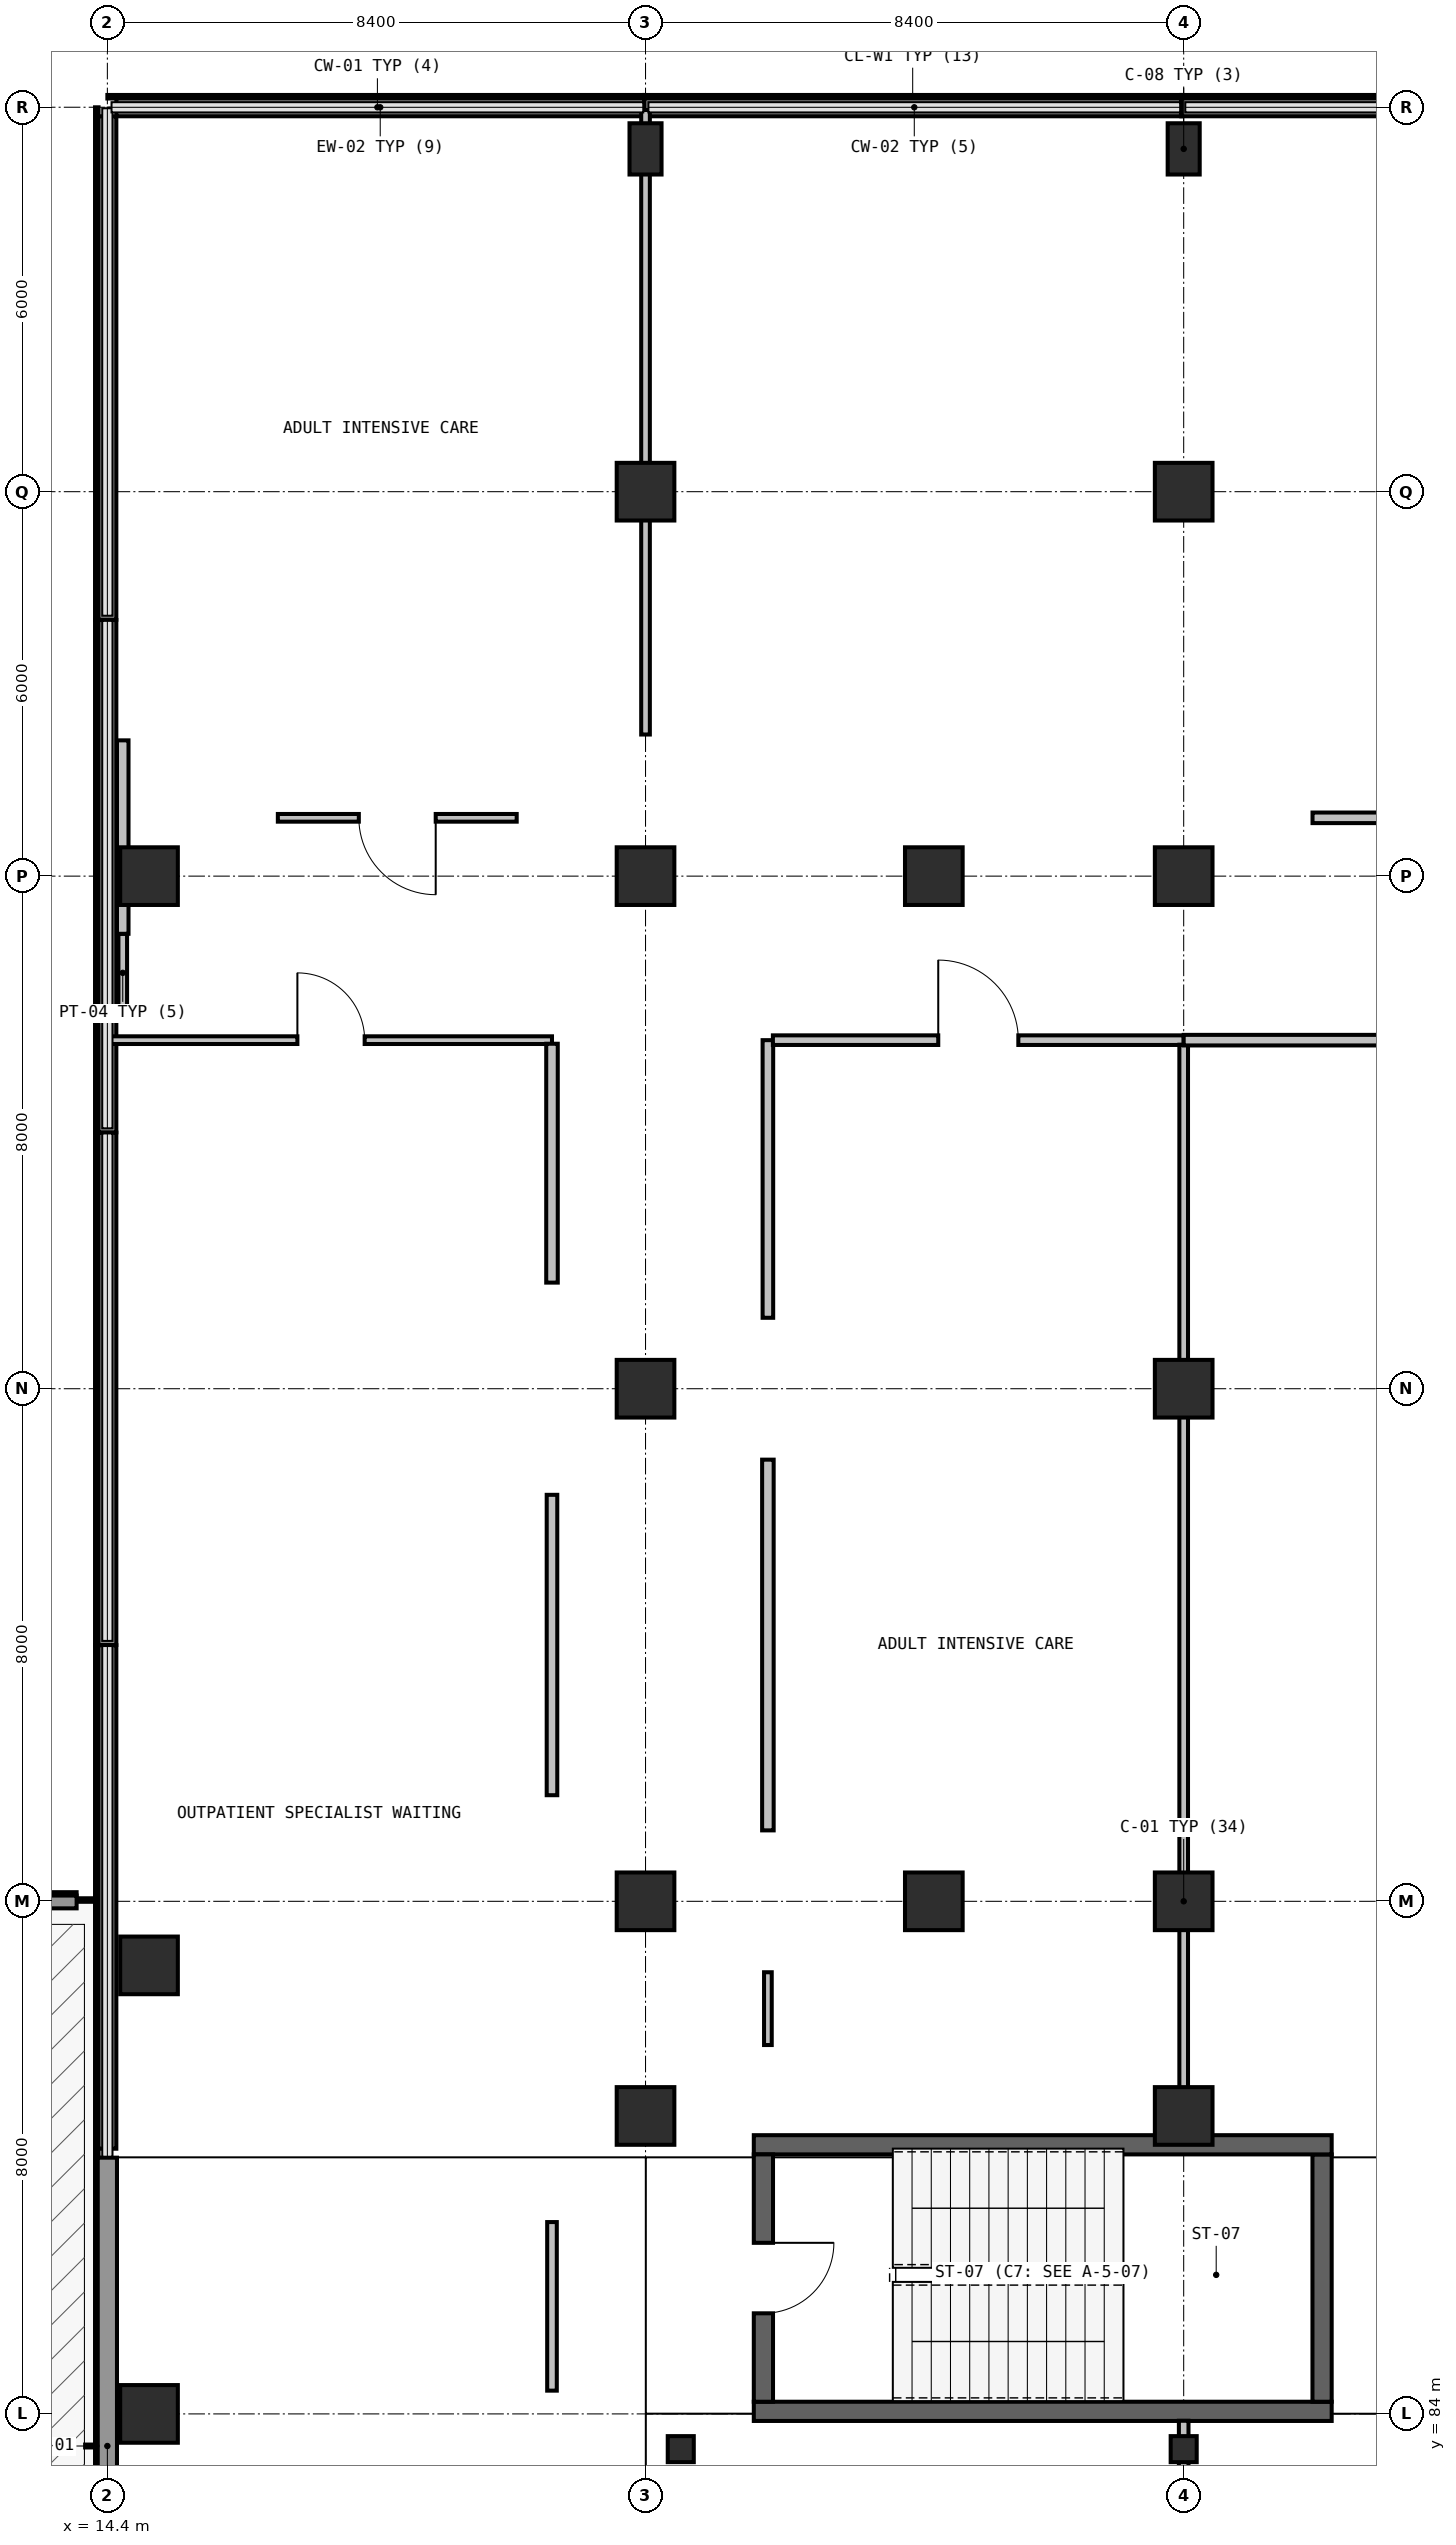
"""IFC4 building model, lengths in metres.
Left out: names, types, materials, properties, quantities, classifications, styles, units other than length and angle.
Written with IfcOpenShell. Run it as: python <this file> out.ifc"""

import sys

from ifc_helpers import new_model, si_unit, direction, frame, frame_2d, origin, origin_2d, place, context, subcontext, project, spatial, rectangle, hollow_circle, extrude, element, fill, save


model = new_model("IFC4")
c1 = context("Model", 3, precision=1e-05, world=origin(), true_north=direction((0.0, 1.0)))
c2 = subcontext(c1, "Body", "Model", "MODEL_VIEW")
j1 = project(units=[si_unit("LENGTHUNIT", "METRE"), si_unit("PLANEANGLEUNIT", "RADIAN")], contexts=[c1])
p1 = place(None, origin())
s1 = spatial("IfcSite", under=j1, at=p1, CompositionType="ELEMENT")
p2 = place(p1, origin())
s2 = spatial("IfcBuilding", under=s1, at=p2, CompositionType="ELEMENT")
p3 = place(p2, frame((0.0, 0.0, 5.4)))
s3 = spatial("IfcBuildingStorey", under=s2, at=p3, CompositionType="ELEMENT", Elevation=5.4)
for number, where, z_axis, x_axis in (
    (1, (23.35, 83.45, 0.0), (0.0, 0.0, 1.0), (1.0, 0.0, 0.0)),
    (2, (31.2, 83.45, 0.0), (0.0, 0.0, 1.0), (1.0, 0.0, 0.0)),
):
    element("IfcColumn", number, at=place(p3, frame(where, z_axis=z_axis, x_axis=x_axis)), inside=s3, PredefinedType="COLUMN", context=c2, shape_type="SweptSolid", body=[
        extrude(hollow_circle(Radius=0.203, WallThickness=0.016, at=origin_2d()), origin(), (0.0, 0.0, 1.0), 4.8),
    ])
for number, where, z_axis, x_axis in (
    (3, (15.05, 84.0, 0.0), (0.0, 0.0, 1.0), (1.0, 0.0, 0.0)),
    (4, (15.05, 91.0, 0.0), (0.0, 0.0, 1.0), (1.0, 0.0, 0.0)),
    (5, (27.3, 92.0, 0.0), (0.0, 0.0, 1.0), (1.0, 0.0, 0.0)),
    (6, (27.3, 108.0, 0.0), (0.0, 0.0, 1.0), (1.0, 0.0, 0.0)),
    (7, (15.05, 108.0, 0.0), (0.0, 0.0, 1.0), (1.0, 0.0, 0.0)),
    (8, (22.8, 88.65, 0.0), (0.0, 0.0, 1.0), (1.0, 0.0, 0.0)),
    (9, (22.8, 92.0, 0.0), (0.0, 0.0, 1.0), (1.0, 0.0, 0.0)),
    (10, (22.8, 100.0, 0.0), (0.0, 0.0, 1.0), (1.0, 0.0, 0.0)),
    (11, (22.8, 108.0, 0.0), (0.0, 0.0, 1.0), (1.0, 0.0, 0.0)),
    (12, (22.8, 114.0, 0.0), (0.0, 0.0, 1.0), (1.0, 0.0, 0.0)),
):
    element("IfcColumn", number, at=place(p3, frame(where, z_axis=z_axis, x_axis=x_axis)), inside=s3, PredefinedType="COLUMN", context=c2, shape_type="SweptSolid", body=[
        extrude(rectangle(XDim=0.9, YDim=0.9, at=origin_2d()), origin(), (0.0, 0.0, 1.0), 4.8),
    ])
p4 = place(p3, frame((22.8, 119.35, 0.0), z_axis=(0.0, 0.0, 1.0), x_axis=(1.0, 0.0, 0.0)))
e13 = element("IfcColumn", 13, at=p4, inside=s3, PredefinedType="COLUMN", context=c2, shape_type="SweptSolid", body=[
    extrude(rectangle(XDim=0.5, YDim=0.8, at=origin_2d()), origin(), (0.0, 0.0, 1.0), 4.8),
])
for number, where, z_axis, x_axis in (
    (14, (31.2, 88.65, 0.0), (0.0, 0.0, 1.0), (1.0, 0.0, 0.0)),
    (15, (31.2, 92.0, 0.0), (0.0, 0.0, 1.0), (1.0, 0.0, 0.0)),
    (16, (31.2, 100.0, 0.0), (0.0, 0.0, 1.0), (1.0, 0.0, 0.0)),
    (17, (31.2, 108.0, 0.0), (0.0, 0.0, 1.0), (1.0, 0.0, 0.0)),
    (18, (31.2, 114.0, 0.0), (0.0, 0.0, 1.0), (1.0, 0.0, 0.0)),
):
    element("IfcColumn", number, at=place(p3, frame(where, z_axis=z_axis, x_axis=x_axis)), inside=s3, PredefinedType="COLUMN", context=c2, shape_type="SweptSolid", body=[
        extrude(rectangle(XDim=0.9, YDim=0.9, at=origin_2d()), origin(), (0.0, 0.0, 1.0), 4.8),
    ])
p5 = place(p3, frame((31.2, 119.35, 0.0), z_axis=(0.0, 0.0, 1.0), x_axis=(1.0, 0.0, 0.0)))
e19 = element("IfcColumn", 19, at=p5, inside=s3, PredefinedType="COLUMN", context=c2, shape_type="SweptSolid", body=[
    extrude(rectangle(XDim=0.5, YDim=0.8, at=origin_2d()), origin(), (0.0, 0.0, 1.0), 4.8),
])
p6 = place(p3, frame((14.4, 78.999, 0.0), z_axis=(0.0, 0.0, 1.0), x_axis=(0.0, 1.0, 0.0)))
e20 = element("IfcWall", 20, at=p6, inside=s3, PredefinedType="SOLIDWALL", context=c2, shape_type="SweptSolid", body=[
    extrude(rectangle(XDim=9.0, YDim=0.3, at=frame_2d((4.5, 0.0))), origin(), (0.0, 0.0, 1.0), 4.445),
])
p7 = place(p6, frame((0.99, 0.0, 0.96)))
e21 = element("IfcOpeningElement", 21, at=p7, cuts=e20, PredefinedType="OPENING", context=c2, shape_type="SweptSolid", body=[
    extrude(rectangle(XDim=2.7, YDim=1.8, at=frame_2d((1.35, 0.9))), frame((0.0, 0.16, 0.0), z_axis=(0.0, -1.0, 0.0), x_axis=(1.0, 0.0, 0.0)), (0.0, 0.0, 1.0), 0.32),
])
p8 = place(p3, frame((14.4, 88.139, 0.0), z_axis=(0.0, 0.0, 1.0), x_axis=(0.0, 1.0, 0.0)))
e22 = element("IfcWall", 22, at=p8, inside=s3, PredefinedType="SOLIDWALL", context=c2, shape_type="SweptSolid", body=[
    extrude(rectangle(XDim=7.858, YDim=0.28, at=frame_2d((3.929, 0.0))), origin(), (0.0, 0.0, 1.0), 0.94),
])
for number, where, z_axis, x_axis in (
    (23, (14.4, 96.001, 0.0), (0.0, 0.0, 1.0), (0.0, 1.0, 0.0)),
    (24, (14.4, 104.001, 0.0), (0.0, 0.0, 1.0), (0.0, 1.0, 0.0)),
):
    element("IfcWall", number, at=place(p3, frame(where, z_axis=z_axis, x_axis=x_axis)), inside=s3, PredefinedType="SOLIDWALL", context=c2, shape_type="SweptSolid", body=[
        extrude(rectangle(XDim=7.996, YDim=0.28, at=frame_2d((3.998, 0.0))), origin(), (0.0, 0.0, 1.0), 0.94),
    ])
p9 = place(p3, frame((14.4, 112.001, 0.0), z_axis=(0.0, 0.0, 1.0), x_axis=(0.0, 1.0, 0.0)))
e25 = element("IfcWall", 25, at=p9, inside=s3, PredefinedType="SOLIDWALL", context=c2, shape_type="SweptSolid", body=[
    extrude(rectangle(XDim=7.858, YDim=0.28, at=frame_2d((3.929, 0.0))), origin(), (0.0, 0.0, 1.0), 0.94),
])
p10 = place(p3, frame((14.54, 119.999, 0.0), z_axis=(0.0, 0.0, 1.0), x_axis=(1.0, 0.0, 0.0)))
e26 = element("IfcWall", 26, at=p10, inside=s3, PredefinedType="SOLIDWALL", context=c2, shape_type="SweptSolid", body=[
    extrude(rectangle(XDim=8.238, YDim=0.28, at=frame_2d((4.119, 0.0))), origin(), (0.0, 0.0, 1.0), 0.94),
])
for number, where, z_axis, x_axis in (
    (27, (22.782, 119.999, 0.0), (0.0, 0.0, 1.0), (1.0, 0.0, 0.0)),
    (28, (31.162, 119.999, 0.0), (0.0, 0.0, 1.0), (1.0, 0.0, 0.0)),
):
    element("IfcWall", number, at=place(p3, frame(where, z_axis=z_axis, x_axis=x_axis)), inside=s3, PredefinedType="SOLIDWALL", context=c2, shape_type="SweptSolid", body=[
        extrude(rectangle(XDim=8.376, YDim=0.28, at=frame_2d((4.188, 0.0))), origin(), (0.0, 0.0, 1.0), 0.94),
    ])
p11 = place(p3, frame((6.0, 91.99, -0.08), z_axis=(0.0, 0.0, 1.0), x_axis=(1.0, 0.0, 0.0)))
e29 = element("IfcWall", 29, at=p11, inside=s3, PredefinedType="PARAPET", context=c2, shape_type="SweptSolid", body=[
    extrude(rectangle(XDim=7.92, YDim=0.2, at=frame_2d((3.96, 0.0))), origin(), (0.0, 0.0, 1.0), 1.15),
])
p12 = place(p3, frame((24.49, 84.04, 0.0), z_axis=(0.0, 0.0, 1.0), x_axis=(1.0, 0.0, 0.0)))
e30 = element("IfcWall", 30, at=p12, inside=s3, PredefinedType="SHEAR", context=c2, shape_type="SweptSolid", body=[
    extrude(rectangle(XDim=9.02, YDim=0.3, at=frame_2d((4.51, 0.0))), origin(), (0.0, 0.0, 1.0), 4.445),
])
p13 = place(p3, frame((33.36, 84.19, 0.0), z_axis=(0.0, 0.0, 1.0), x_axis=(0.0, 1.0, 0.0)))
e31 = element("IfcWall", 31, at=p13, inside=s3, PredefinedType="SHEAR", context=c2, shape_type="SweptSolid", body=[
    extrude(rectangle(XDim=3.86, YDim=0.3, at=frame_2d((1.93, 0.0))), origin(), (0.0, 0.0, 1.0), 4.445),
])
p14 = place(p3, frame((33.51, 88.2, 0.0), z_axis=(0.0, 0.0, 1.0), x_axis=(-1.0, 0.0, 0.0)))
e32 = element("IfcWall", 32, at=p14, inside=s3, PredefinedType="SHEAR", context=c2, shape_type="SweptSolid", body=[
    extrude(rectangle(XDim=9.02, YDim=0.3, at=frame_2d((4.51, 0.0))), origin(), (0.0, 0.0, 1.0), 4.445),
])
p15 = place(p3, frame((24.64, 88.05, 0.0), z_axis=(0.0, 0.0, 1.0), x_axis=(0.0, -1.0, 0.0)))
e33 = element("IfcWall", 33, at=p15, inside=s3, PredefinedType="SHEAR", context=c2, shape_type="SweptSolid", body=[
    extrude(rectangle(XDim=3.86, YDim=0.3, at=frame_2d((1.93, 0.0))), origin(), (0.0, 0.0, 1.0), 4.445),
])
p16 = place(p15, frame((1.38, 0.0, 0.0)))
e34 = element("IfcOpeningElement", 34, at=p16, cuts=e33, PredefinedType="OPENING", context=c2, shape_type="SweptSolid", body=[
    extrude(rectangle(XDim=1.1, YDim=2.15, at=frame_2d((0.55, 1.075))), frame((0.0, 0.16, 0.0), z_axis=(0.0, -1.0, 0.0), x_axis=(1.0, 0.0, 0.0)), (0.0, 0.0, 1.0), 0.32),
])
p17 = place(p3, frame((14.64, 107.1, 0.0), z_axis=(0.0, 0.0, 1.0), x_axis=(0.0, -1.0, 0.0)))
e35 = element("IfcWall", 35, at=p17, inside=s3, PredefinedType="PARTITIONING", context=c2, shape_type="SweptSolid", body=[
    extrude(rectangle(XDim=1.219, YDim=0.135, at=frame_2d((0.609, 0.0))), origin(), (0.0, 0.0, 1.0), 4.445),
])
p18 = place(p3, frame((14.442, 105.44, 0.0), z_axis=(0.0, 0.0, 1.0), x_axis=(1.0, 0.0, 0.0)))
e36 = element("IfcWall", 36, at=p18, inside=s3, PredefinedType="PARTITIONING", context=c2, shape_type="SweptSolid", body=[
    extrude(rectangle(XDim=6.898, YDim=0.12, at=frame_2d((3.449, 0.0))), origin(), (0.0, 0.0, 1.0), 4.445),
])
p19 = place(p18, frame((2.924, 0.0, 0.0)))
e37 = element("IfcOpeningElement", 37, at=p19, cuts=e36, PredefinedType="OPENING", context=c2, shape_type="SweptSolid", body=[
    extrude(rectangle(XDim=1.05, YDim=2.15, at=frame_2d((0.525, 1.075))), frame((0.0, 0.07, 0.0), z_axis=(0.0, -1.0, 0.0), x_axis=(1.0, 0.0, 0.0)), (0.0, 0.0, 1.0), 0.14),
])
p20 = place(p3, frame((21.34, 105.384, 0.0), z_axis=(0.0, 0.0, 1.0), x_axis=(0.0, -1.0, 0.0)))
e38 = element("IfcWall", 38, at=p20, inside=s3, PredefinedType="PARTITIONING", context=c2, shape_type="SweptSolid", body=[
    extrude(rectangle(XDim=3.728, YDim=0.18, at=frame_2d((1.864, 0.0))), origin(), (0.0, 0.0, 1.0), 4.445),
])
p21 = place(p3, frame((21.34, 98.344, 0.0), z_axis=(0.0, 0.0, 1.0), x_axis=(0.0, -1.0, 0.0)))
e39 = element("IfcWall", 39, at=p21, inside=s3, PredefinedType="PARTITIONING", context=c2, shape_type="SweptSolid", body=[
    extrude(rectangle(XDim=4.688, YDim=0.165, at=frame_2d((2.344, 0.0))), origin(), (0.0, 0.0, 1.0), 4.445),
])
p22 = place(p3, frame((21.34, 86.994, 0.0), z_axis=(0.0, 0.0, 1.0), x_axis=(0.0, -1.0, 0.0)))
e40 = element("IfcWall", 40, at=p22, inside=s3, PredefinedType="PARTITIONING", context=c2, shape_type="SweptSolid", body=[
    extrude(rectangle(XDim=2.631, YDim=0.15, at=frame_2d((1.315, 0.0))), origin(), (0.0, 0.0, 1.0), 4.445),
])
p23 = place(p3, frame((24.71, 101.107, 0.0), z_axis=(0.0, 0.0, 1.0), x_axis=(0.0, 1.0, 0.0)))
e41 = element("IfcWall", 41, at=p23, inside=s3, PredefinedType="PARTITIONING", context=c2, shape_type="SweptSolid", body=[
    extrude(rectangle(XDim=4.333, YDim=0.165, at=frame_2d((2.167, 0.0))), origin(), (0.0, 0.0, 1.0), 4.445),
])
p24 = place(p3, frame((24.788, 105.44, 0.0), z_axis=(0.0, 0.0, 1.0), x_axis=(1.0, 0.0, 0.0)))
e42 = element("IfcWall", 42, at=p24, inside=s3, PredefinedType="PARTITIONING", context=c2, shape_type="SweptSolid", body=[
    extrude(rectangle(XDim=6.412, YDim=0.15, at=frame_2d((3.206, 0.0))), origin(), (0.0, 0.0, 1.0), 4.445),
])
p25 = place(p24, frame((2.581, 0.0, 0.0)))
e43 = element("IfcOpeningElement", 43, at=p25, cuts=e42, PredefinedType="OPENING", context=c2, shape_type="SweptSolid", body=[
    extrude(rectangle(XDim=1.25, YDim=2.15, at=frame_2d((0.625, 1.075))), frame((0.0, 0.085, 0.0), z_axis=(0.0, -1.0, 0.0), x_axis=(1.0, 0.0, 0.0)), (0.0, 0.0, 1.0), 0.17),
])
p26 = place(p3, frame((31.2, 105.369, 0.0), z_axis=(0.0, 0.0, 1.0), x_axis=(0.0, -1.0, 0.0)))
e44 = element("IfcWall", 44, at=p26, inside=s3, PredefinedType="PARTITIONING", context=c2, shape_type="SweptSolid", body=[
    extrude(rectangle(XDim=17.022, YDim=0.135, at=frame_2d((8.511, 0.0))), origin(), (0.0, 0.0, 1.0), 3.695),
])
p27 = place(p3, frame((24.71, 89.757, 0.0), z_axis=(0.0, 0.0, 1.0), x_axis=(0.0, 1.0, 0.0)))
e45 = element("IfcWall", 45, at=p27, inside=s3, PredefinedType="PARTITIONING", context=c2, shape_type="SweptSolid", body=[
    extrude(rectangle(XDim=1.136, YDim=0.12, at=frame_2d((0.568, 0.0))), origin(), (0.0, 0.0, 1.0), 4.445),
])
p28 = place(p3, frame((24.71, 93.107, 0.0), z_axis=(0.0, 0.0, 1.0), x_axis=(0.0, 1.0, 0.0)))
e46 = element("IfcWall", 46, at=p28, inside=s3, PredefinedType="PARTITIONING", context=c2, shape_type="SweptSolid", body=[
    extrude(rectangle(XDim=5.786, YDim=0.18, at=frame_2d((2.893, 0.0))), origin(), (0.0, 0.0, 1.0), 4.445),
])
p29 = place(p3, frame((31.2, 83.893, 0.0), z_axis=(0.0, 0.0, 1.0), x_axis=(0.0, -1.0, 0.0)))
e47 = element("IfcWall", 47, at=p29, inside=s3, PredefinedType="PARTITIONING", context=c2, shape_type="SweptSolid", body=[
    extrude(rectangle(XDim=4.333, YDim=0.15, at=frame_2d((2.167, 0.0))), origin(), (0.0, 0.0, 1.0), 3.695),
])
p30 = place(p3, frame((31.2, 105.44, 0.0), z_axis=(0.0, 0.0, 1.0), x_axis=(1.0, 0.0, 0.0)))
e48 = element("IfcWall", 48, at=p30, inside=s3, PredefinedType="PARTITIONING", context=c2, shape_type="SweptSolid", body=[
    extrude(rectangle(XDim=15.315, YDim=0.165, at=frame_2d((7.657, 0.0))), origin(), (0.0, 0.0, 1.0), 4.445),
])
p31 = place(p3, frame((22.8, 119.957, 0.0), z_axis=(0.0, 0.0, 1.0), x_axis=(0.0, -1.0, 0.0)))
e49 = element("IfcWall", 49, at=p31, inside=s3, PredefinedType="PARTITIONING", context=c2, shape_type="SweptSolid", body=[
    extrude(rectangle(XDim=9.747, YDim=0.135, at=frame_2d((4.874, 0.0))), origin(), (0.0, 0.0, 1.0), 3.695),
])
p32 = place(p3, frame((20.789, 108.91, 0.0), z_axis=(0.0, 0.0, 1.0), x_axis=(-1.0, 0.0, 0.0)))
e50 = element("IfcWall", 50, at=p32, inside=s3, PredefinedType="PARTITIONING", context=c2, shape_type="SweptSolid", body=[
    extrude(rectangle(XDim=3.728, YDim=0.12, at=frame_2d((1.864, 0.0))), origin(), (0.0, 0.0, 1.0), 4.445),
])
p33 = place(p32, frame((1.264, 0.0, 0.0)))
e51 = element("IfcOpeningElement", 51, at=p33, cuts=e50, PredefinedType="OPENING", context=c2, shape_type="SweptSolid", body=[
    extrude(rectangle(XDim=1.2, YDim=2.15, at=frame_2d((0.6, 1.075))), frame((0.0, 0.07, 0.0), z_axis=(0.0, -1.0, 0.0), x_axis=(1.0, 0.0, 0.0)), (0.0, 0.0, 1.0), 0.14),
])
p34 = place(p3, frame((14.64, 110.119, 0.0), z_axis=(0.0, 0.0, 1.0), x_axis=(0.0, -1.0, 0.0)))
e52 = element("IfcWall", 52, at=p34, inside=s3, PredefinedType="PARTITIONING", context=c2, shape_type="SweptSolid", body=[
    extrude(rectangle(XDim=3.019, YDim=0.18, at=frame_2d((1.509, 0.0))), origin(), (0.0, 0.0, 1.0), 4.445),
])
p35 = place(p3, frame((37.589, 108.91, 0.0), z_axis=(0.0, 0.0, 1.0), x_axis=(-1.0, 0.0, 0.0)))
e53 = element("IfcWall", 53, at=p35, inside=s3, PredefinedType="PARTITIONING", context=c2, shape_type="SweptSolid", body=[
    extrude(rectangle(XDim=4.378, YDim=0.165, at=frame_2d((2.189, 0.0))), origin(), (0.0, 0.0, 1.0), 4.445),
])
p36 = place(p16, origin())
e54 = element("IfcDoor", 54, at=p36, inside=s3, OperationType="SINGLE_SWING_RIGHT", PredefinedType="DOOR", context=c2, shape_type="SweptSolid", body=[
    extrude(rectangle(XDim=1.1, YDim=2.15, at=frame_2d((0.55, 1.075))), frame((0.0, 0.025, 0.0), z_axis=(0.0, -1.0, 0.0), x_axis=(1.0, 0.0, 0.0)), (0.0, 0.0, 1.0), 0.05),
])
fill(e34, e54)
p37 = place(p19, origin())
e55 = element("IfcDoor", 55, at=p37, inside=s3, OperationType="SINGLE_SWING_RIGHT", PredefinedType="DOOR", context=c2, shape_type="SweptSolid", body=[
    extrude(rectangle(XDim=1.05, YDim=2.15, at=frame_2d((0.525, 1.075))), frame((0.0, 0.025, 0.0), z_axis=(0.0, -1.0, 0.0), x_axis=(1.0, 0.0, 0.0)), (0.0, 0.0, 1.0), 0.05),
])
fill(e37, e55)
p38 = place(p25, origin())
e56 = element("IfcDoor", 56, at=p38, inside=s3, OperationType="SINGLE_SWING_LEFT", PredefinedType="DOOR", context=c2, shape_type="SweptSolid", body=[
    extrude(rectangle(XDim=1.25, YDim=2.15, at=frame_2d((0.625, 1.075))), frame((0.0, 0.025, 0.0), z_axis=(0.0, -1.0, 0.0), x_axis=(1.0, 0.0, 0.0)), (0.0, 0.0, 1.0), 0.05),
])
fill(e43, e56)
p39 = place(p33, origin())
e57 = element("IfcDoor", 57, at=p39, inside=s3, OperationType="SINGLE_SWING_RIGHT", PredefinedType="DOOR", context=c2, shape_type="SweptSolid", body=[
    extrude(rectangle(XDim=1.2, YDim=2.15, at=frame_2d((0.6, 1.075))), frame((0.0, 0.025, 0.0), z_axis=(0.0, -1.0, 0.0), x_axis=(1.0, 0.0, 0.0)), (0.0, 0.0, 1.0), 0.05),
])
fill(e51, e57)
save(model, sys.argv[1])
